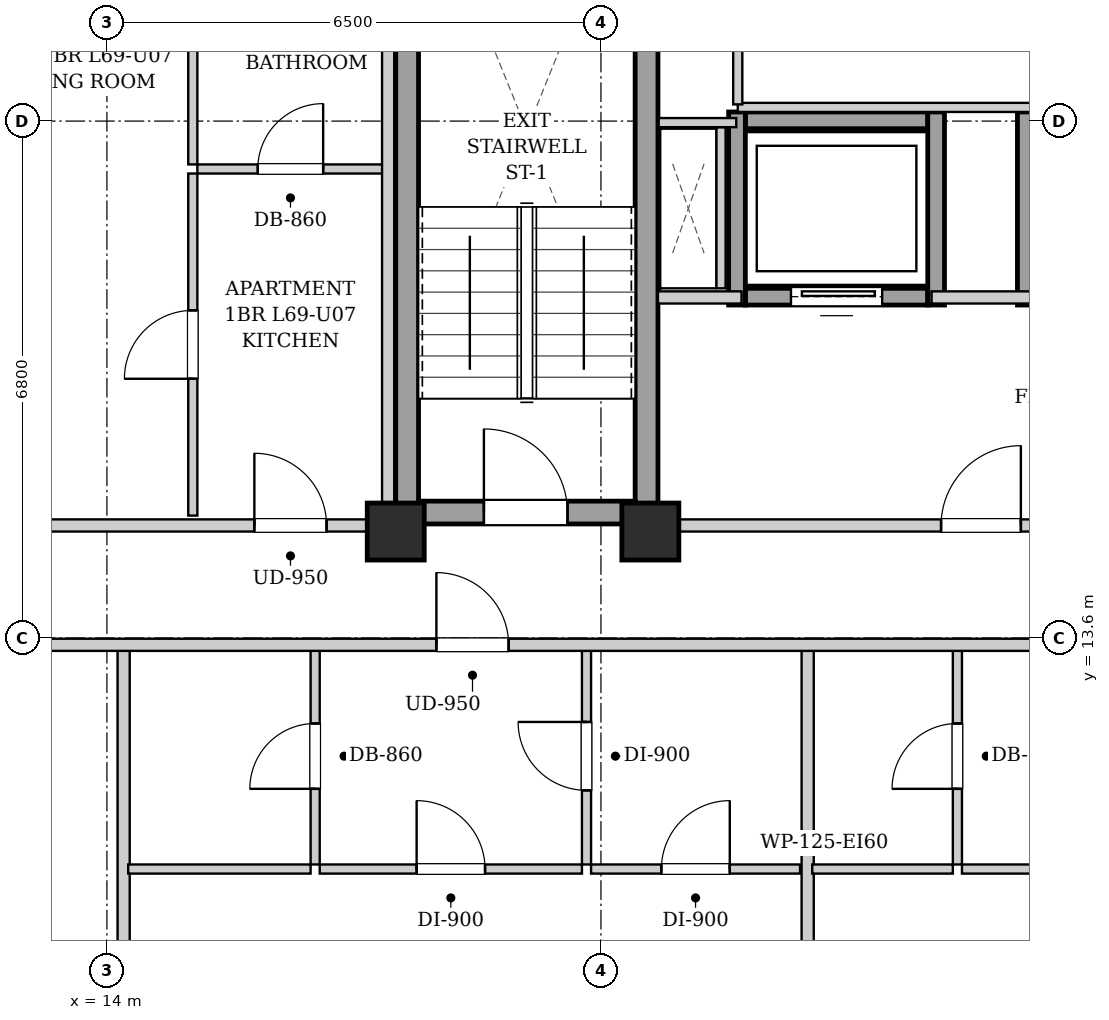
"""IFC4 building model, lengths in metres.
Left out: names, types, materials, properties, quantities, classifications, styles, units other than length and angle.
Written with IfcOpenShell. Run it as: python <this file> out.ifc"""

import sys

from ifc_helpers import new_model, si_unit, direction, frame, frame_2d, origin, origin_2d, place, context, subcontext, project, spatial, rectangle, extrude, element, fill, save


model = new_model("IFC4")
c1 = context("Model", 3, precision=1e-05, world=origin(), true_north=direction((0.0, 1.0)))
c2 = subcontext(c1, "Body", "Model", "MODEL_VIEW")
j1 = project(units=[si_unit("LENGTHUNIT", "METRE"), si_unit("PLANEANGLEUNIT", "RADIAN")], contexts=[c1])
p1 = place(None, origin())
s1 = spatial("IfcSite", under=j1, at=p1, CompositionType="ELEMENT")
p2 = place(p1, origin())
s2 = spatial("IfcBuilding", under=s1, at=p2, CompositionType="ELEMENT")
p3 = place(p2, frame((0.0, 0.0, 237.7)))
s3 = spatial("IfcBuildingStorey", under=s2, at=p3, CompositionType="ELEMENT", Elevation=237.7)
for number, where, z_axis, x_axis in (
    (1, (17.8, 15.0, 0.0), (0.0, 0.0, 1.0), (1.0, 0.0, 0.0)),
    (2, (21.15, 15.0, 0.0), (0.0, 0.0, 1.0), (1.0, 0.0, 0.0)),
):
    element("IfcColumn", number, at=place(p3, frame(where, z_axis=z_axis, x_axis=x_axis)), inside=s3, PredefinedType="COLUMN", context=c2, shape_type="SweptSolid", body=[
        extrude(rectangle(XDim=0.75, YDim=0.75, at=origin_2d()), origin(), (0.0, 0.0, 1.0), 3.4),
    ])
for number, where, z_axis, x_axis in (
    (3, (17.95, 15.1, 0.0), (0.0, 0.0, 1.0), (0.0, 1.0, 0.0)),
    (4, (21.1, 15.1, 0.0), (0.0, 0.0, 1.0), (0.0, 1.0, 0.0)),
):
    element("IfcWall", number, at=place(p3, frame(where, z_axis=z_axis, x_axis=x_axis)), inside=s3, PredefinedType="SHEAR", context=c2, shape_type="SweptSolid", body=[
        extrude(rectangle(XDim=9.0, YDim=0.3, at=frame_2d((4.5, 0.0))), origin(), (0.0, 0.0, 1.0), 3.14),
    ])
p4 = place(p3, frame((18.1, 15.25, 0.0), z_axis=(0.0, 0.0, 1.0), x_axis=(1.0, 0.0, 0.0)))
e5 = element("IfcWall", 5, at=p4, inside=s3, PredefinedType="SHEAR", context=c2, shape_type="SweptSolid", body=[
    extrude(rectangle(XDim=2.85, YDim=0.3, at=frame_2d((1.425, 0.0))), origin(), (0.0, 0.0, 1.0), 3.14),
])
p5 = place(p4, frame((0.86, 0.0, 0.0)))
e6 = element("IfcOpeningElement", 6, at=p5, cuts=e5, PredefinedType="OPENING", context=c2, shape_type="SweptSolid", body=[
    extrude(rectangle(XDim=1.1, YDim=2.05, at=frame_2d((0.55, 1.025))), frame((0.0, 0.16, 0.0), z_axis=(0.0, -1.0, 0.0), x_axis=(1.0, 0.0, 0.0)), (0.0, 0.0, 1.0), 0.32),
])
p6 = place(p3, frame((22.4, 18.09, 0.0), z_axis=(0.0, 0.0, 1.0), x_axis=(1.0, 0.0, 0.0)))
e7 = element("IfcWall", 7, at=p6, inside=s3, PredefinedType="SHEAR", context=c2, shape_type="SweptSolid", body=[
    extrude(rectangle(XDim=2.4, YDim=0.22, at=frame_2d((1.2, 0.0))), origin(), (0.0, 0.0, 1.0), 3.14),
])
p7 = place(p6, frame((0.6, 0.0, 0.0)))
e8 = element("IfcOpeningElement", 8, at=p7, cuts=e7, PredefinedType="OPENING", context=c2, shape_type="SweptSolid", body=[
    extrude(rectangle(XDim=1.2, YDim=2.15, at=frame_2d((0.6, 1.075))), frame((0.0, 0.12, 0.0), z_axis=(0.0, -1.0, 0.0), x_axis=(1.0, 0.0, 0.0)), (0.0, 0.0, 1.0), 0.24),
])
p8 = place(p3, frame((22.4, 20.41, 0.0), z_axis=(0.0, 0.0, 1.0), x_axis=(1.0, 0.0, 0.0)))
e9 = element("IfcWall", 9, at=p8, inside=s3, PredefinedType="SHEAR", context=c2, shape_type="SweptSolid", body=[
    extrude(rectangle(XDim=2.4, YDim=0.22, at=frame_2d((1.2, 0.0))), origin(), (0.0, 0.0, 1.0), 3.14),
])
for number, where, z_axis, x_axis in (
    (10, (22.29, 17.98, 0.0), (0.0, 0.0, 1.0), (0.0, 1.0, 0.0)),
    (11, (24.91, 17.98, 0.0), (0.0, 0.0, 1.0), (0.0, 1.0, 0.0)),
    (12, (26.09, 17.98, 0.0), (0.0, 0.0, 1.0), (0.0, 1.0, 0.0)),
):
    element("IfcWall", number, at=place(p3, frame(where, z_axis=z_axis, x_axis=x_axis)), inside=s3, PredefinedType="SHEAR", context=c2, shape_type="SweptSolid", body=[
        extrude(rectangle(XDim=2.54, YDim=0.22, at=frame_2d((1.27, 0.0))), origin(), (0.0, 0.0, 1.0), 3.14),
    ])
p9 = place(p3, frame((21.25, 15.08, 0.0), z_axis=(0.0, 0.0, 1.0), x_axis=(1.0, 0.0, 0.0)))
e13 = element("IfcWall", 13, at=p9, inside=s3, PredefinedType="PARTITIONING", context=c2, shape_type="SweptSolid", body=[
    extrude(rectangle(XDim=8.5, YDim=0.16, at=frame_2d((4.25, 0.0))), origin(), (0.0, 0.0, 1.0), 2.668),
])
p10 = place(p9, frame((3.725, 0.0, 0.0)))
e14 = element("IfcOpeningElement", 14, at=p10, cuts=e13, PredefinedType="OPENING", context=c2, shape_type="SweptSolid", body=[
    extrude(rectangle(XDim=1.05, YDim=2.05, at=frame_2d((0.525, 1.025))), frame((0.0, 0.09, 0.0), z_axis=(0.0, -1.0, 0.0), x_axis=(1.0, 0.0, 0.0)), (0.0, 0.0, 1.0), 0.18),
])
p11 = place(p3, frame((21.25, 18.08, 0.0), z_axis=(0.0, 0.0, 1.0), x_axis=(1.0, 0.0, 0.0)))
e15 = element("IfcWall", 15, at=p11, inside=s3, PredefinedType="PARTITIONING", context=c2, shape_type="SweptSolid", body=[
    extrude(rectangle(XDim=1.1, YDim=0.16, at=frame_2d((0.55, 0.0))), origin(), (0.0, 0.0, 1.0), 3.14),
])
p12 = place(p3, frame((24.85, 18.08, 0.0), z_axis=(0.0, 0.0, 1.0), x_axis=(1.0, 0.0, 0.0)))
e16 = element("IfcWall", 16, at=p12, inside=s3, PredefinedType="PARTITIONING", context=c2, shape_type="SweptSolid", body=[
    extrude(rectangle(XDim=1.3, YDim=0.16, at=frame_2d((0.65, 0.0))), origin(), (0.0, 0.0, 1.0), 3.14),
])
p13 = place(p3, frame((22.08, 18.2, 0.0), z_axis=(0.0, 0.0, 1.0), x_axis=(0.0, 1.0, 0.0)))
e17 = element("IfcWall", 17, at=p13, inside=s3, PredefinedType="PARTITIONING", context=c2, shape_type="SweptSolid", body=[
    extrude(rectangle(XDim=2.12, YDim=0.12, at=frame_2d((1.06, 0.0))), origin(), (0.0, 0.0, 1.0), 3.14),
])
p14 = place(p3, frame((22.28, 20.38, 0.0), z_axis=(0.0, 0.0, 1.0), x_axis=(-1.0, 0.0, 0.0)))
e18 = element("IfcWall", 18, at=p14, inside=s3, PredefinedType="PARTITIONING", context=c2, shape_type="SweptSolid", body=[
    extrude(rectangle(XDim=1.02, YDim=0.12, at=frame_2d((0.51, 0.0))), origin(), (0.0, 0.0, 1.0), 3.14),
])
p15 = place(p3, frame((22.3, 20.58, 0.0), z_axis=(0.0, 0.0, 1.0), x_axis=(1.0, 0.0, 0.0)))
e19 = element("IfcWall", 19, at=p15, inside=s3, PredefinedType="PARTITIONING", context=c2, shape_type="SweptSolid", body=[
    extrude(rectangle(XDim=7.35, YDim=0.12, at=frame_2d((3.675, 0.0))), origin(), (0.0, 0.0, 1.0), 3.14),
])
p16 = place(p3, frame((22.3, 20.62, 0.0), z_axis=(0.0, 0.0, 1.0), x_axis=(0.0, 1.0, 0.0)))
e20 = element("IfcWall", 20, at=p16, inside=s3, PredefinedType="PARTITIONING", context=c2, shape_type="SweptSolid", body=[
    extrude(rectangle(XDim=2.06, YDim=0.12, at=frame_2d((1.03, 0.0))), origin(), (0.0, 0.0, 1.0), 3.14),
])
p17 = place(p3, frame((14.22, 4.08, 0.0), z_axis=(0.0, 0.0, 1.0), x_axis=(0.0, 1.0, 0.0)))
e21 = element("IfcWall", 21, at=p17, inside=s3, PredefinedType="PARTITIONING", context=c2, shape_type="SweptSolid", body=[
    extrude(rectangle(XDim=9.39, YDim=0.16, at=frame_2d((4.695, 0.0))), origin(), (0.0, 0.0, 1.0), 3.14),
])
p18 = place(p3, frame((16.74, 10.62, 0.0), z_axis=(0.0, 0.0, 1.0), x_axis=(0.0, 1.0, 0.0)))
e22 = element("IfcWall", 22, at=p18, inside=s3, PredefinedType="PARTITIONING", context=c2, shape_type="SweptSolid", body=[
    extrude(rectangle(XDim=2.85, YDim=0.12, at=frame_2d((1.425, 0.0))), origin(), (0.0, 0.0, 1.0), 3.14),
])
p19 = place(p18, frame((0.995, 0.0, 0.0)))
e23 = element("IfcOpeningElement", 23, at=p19, cuts=e22, PredefinedType="OPENING", context=c2, shape_type="SweptSolid", body=[
    extrude(rectangle(XDim=0.86, YDim=2.05, at=frame_2d((0.43, 1.025))), frame((0.0, 0.07, 0.0), z_axis=(0.0, -1.0, 0.0), x_axis=(1.0, 0.0, 0.0)), (0.0, 0.0, 1.0), 0.14),
])
p20 = place(p3, frame((14.28, 10.56, 0.0), z_axis=(0.0, 0.0, 1.0), x_axis=(1.0, 0.0, 0.0)))
e24 = element("IfcWall", 24, at=p20, inside=s3, PredefinedType="PARTITIONING", context=c2, shape_type="SweptSolid", body=[
    extrude(rectangle(XDim=2.4, YDim=0.12, at=frame_2d((1.2, 0.0))), origin(), (0.0, 0.0, 1.0), 3.14),
])
p21 = place(p3, frame((20.31, 10.62, 0.0), z_axis=(0.0, 0.0, 1.0), x_axis=(0.0, 1.0, 0.0)))
e25 = element("IfcWall", 25, at=p21, inside=s3, PredefinedType="PARTITIONING", context=c2, shape_type="SweptSolid", body=[
    extrude(rectangle(XDim=2.85, YDim=0.12, at=frame_2d((1.425, 0.0))), origin(), (0.0, 0.0, 1.0), 3.14),
])
p22 = place(p21, frame((0.975, 0.0, 0.0)))
e26 = element("IfcOpeningElement", 26, at=p22, cuts=e25, PredefinedType="OPENING", context=c2, shape_type="SweptSolid", body=[
    extrude(rectangle(XDim=0.9, YDim=2.05, at=frame_2d((0.45, 1.025))), frame((0.0, 0.07, 0.0), z_axis=(0.0, -1.0, 0.0), x_axis=(1.0, 0.0, 0.0)), (0.0, 0.0, 1.0), 0.14),
])
p23 = place(p3, frame((16.8, 10.56, 0.0), z_axis=(0.0, 0.0, 1.0), x_axis=(1.0, 0.0, 0.0)))
e27 = element("IfcWall", 27, at=p23, inside=s3, PredefinedType="PARTITIONING", context=c2, shape_type="SweptSolid", body=[
    extrude(rectangle(XDim=3.45, YDim=0.12, at=frame_2d((1.725, 0.0))), origin(), (0.0, 0.0, 1.0), 3.14),
])
p24 = place(p23, frame((1.275, 0.0, 0.0)))
e28 = element("IfcOpeningElement", 28, at=p24, cuts=e27, PredefinedType="OPENING", context=c2, shape_type="SweptSolid", body=[
    extrude(rectangle(XDim=0.9, YDim=2.05, at=frame_2d((0.45, 1.025))), frame((0.0, 0.07, 0.0), z_axis=(0.0, -1.0, 0.0), x_axis=(1.0, 0.0, 0.0)), (0.0, 0.0, 1.0), 0.14),
])
p25 = place(p3, frame((20.37, 10.56, 0.0), z_axis=(0.0, 0.0, 1.0), x_axis=(1.0, 0.0, 0.0)))
e29 = element("IfcWall", 29, at=p25, inside=s3, PredefinedType="PARTITIONING", context=c2, shape_type="SweptSolid", body=[
    extrude(rectangle(XDim=2.75, YDim=0.12, at=frame_2d((1.375, 0.0))), origin(), (0.0, 0.0, 1.0), 3.14),
])
p26 = place(p25, frame((0.925, 0.0, 0.0)))
e30 = element("IfcOpeningElement", 30, at=p26, cuts=e29, PredefinedType="OPENING", context=c2, shape_type="SweptSolid", body=[
    extrude(rectangle(XDim=0.9, YDim=2.05, at=frame_2d((0.45, 1.025))), frame((0.0, 0.07, 0.0), z_axis=(0.0, -1.0, 0.0), x_axis=(1.0, 0.0, 0.0)), (0.0, 0.0, 1.0), 0.14),
])
p27 = place(p3, frame((23.22, 4.08, 0.0), z_axis=(0.0, 0.0, 1.0), x_axis=(0.0, 1.0, 0.0)))
e31 = element("IfcWall", 31, at=p27, inside=s3, PredefinedType="PARTITIONING", context=c2, shape_type="SweptSolid", body=[
    extrude(rectangle(XDim=9.39, YDim=0.16, at=frame_2d((4.695, 0.0))), origin(), (0.0, 0.0, 1.0), 3.14),
])
p28 = place(p3, frame((25.19, 10.62, 0.0), z_axis=(0.0, 0.0, 1.0), x_axis=(0.0, 1.0, 0.0)))
e32 = element("IfcWall", 32, at=p28, inside=s3, PredefinedType="PARTITIONING", context=c2, shape_type="SweptSolid", body=[
    extrude(rectangle(XDim=2.85, YDim=0.12, at=frame_2d((1.425, 0.0))), origin(), (0.0, 0.0, 1.0), 3.14),
])
p29 = place(p28, frame((0.995, 0.0, 0.0)))
e33 = element("IfcOpeningElement", 33, at=p29, cuts=e32, PredefinedType="OPENING", context=c2, shape_type="SweptSolid", body=[
    extrude(rectangle(XDim=0.86, YDim=2.05, at=frame_2d((0.43, 1.025))), frame((0.0, 0.07, 0.0), z_axis=(0.0, -1.0, 0.0), x_axis=(1.0, 0.0, 0.0)), (0.0, 0.0, 1.0), 0.14),
])
p30 = place(p3, frame((23.28, 10.56, 0.0), z_axis=(0.0, 0.0, 1.0), x_axis=(1.0, 0.0, 0.0)))
e34 = element("IfcWall", 34, at=p30, inside=s3, PredefinedType="PARTITIONING", context=c2, shape_type="SweptSolid", body=[
    extrude(rectangle(XDim=1.85, YDim=0.12, at=frame_2d((0.925, 0.0))), origin(), (0.0, 0.0, 1.0), 3.14),
])
p31 = place(p3, frame((25.25, 10.56, 0.0), z_axis=(0.0, 0.0, 1.0), x_axis=(1.0, 0.0, 0.0)))
e35 = element("IfcWall", 35, at=p31, inside=s3, PredefinedType="PARTITIONING", context=c2, shape_type="SweptSolid", body=[
    extrude(rectangle(XDim=3.755, YDim=0.12, at=frame_2d((1.877, 0.0))), origin(), (0.0, 0.0, 1.0), 3.14),
])
p32 = place(p31, frame((1.427, 0.0, 0.0)))
e36 = element("IfcOpeningElement", 36, at=p32, cuts=e35, PredefinedType="OPENING", context=c2, shape_type="SweptSolid", body=[
    extrude(rectangle(XDim=0.9, YDim=2.05, at=frame_2d((0.45, 1.025))), frame((0.0, 0.07, 0.0), z_axis=(0.0, -1.0, 0.0), x_axis=(1.0, 0.0, 0.0)), (0.0, 0.0, 1.0), 0.14),
])
p33 = place(p3, frame((10.88, 15.08, 0.0), z_axis=(0.0, 0.0, 1.0), x_axis=(1.0, 0.0, 0.0)))
e37 = element("IfcWall", 37, at=p33, inside=s3, PredefinedType="PARTITIONING", context=c2, shape_type="SweptSolid", body=[
    extrude(rectangle(XDim=6.88, YDim=0.16, at=frame_2d((3.44, 0.0))), origin(), (0.0, 0.0, 1.0), 2.668),
])
p34 = place(p33, frame((5.06, 0.0, 0.0)))
e38 = element("IfcOpeningElement", 38, at=p34, cuts=e37, PredefinedType="OPENING", context=c2, shape_type="SweptSolid", body=[
    extrude(rectangle(XDim=0.95, YDim=2.1, at=frame_2d((0.475, 1.05))), frame((0.0, 0.09, 0.0), z_axis=(0.0, -1.0, 0.0), x_axis=(1.0, 0.0, 0.0)), (0.0, 0.0, 1.0), 0.18),
])
p35 = place(p3, frame((15.19, 19.77, 0.0), z_axis=(0.0, 0.0, 1.0), x_axis=(1.0, 0.0, 0.0)))
e39 = element("IfcWall", 39, at=p35, inside=s3, PredefinedType="PARTITIONING", context=c2, shape_type="SweptSolid", body=[
    extrude(rectangle(XDim=2.45, YDim=0.12, at=frame_2d((1.225, 0.0))), origin(), (0.0, 0.0, 1.0), 3.14),
])
p36 = place(p35, frame((0.795, 0.0, 0.0)))
e40 = element("IfcOpeningElement", 40, at=p36, cuts=e39, PredefinedType="OPENING", context=c2, shape_type="SweptSolid", body=[
    extrude(rectangle(XDim=0.86, YDim=2.05, at=frame_2d((0.43, 1.025))), frame((0.0, 0.07, 0.0), z_axis=(0.0, -1.0, 0.0), x_axis=(1.0, 0.0, 0.0)), (0.0, 0.0, 1.0), 0.14),
])
p37 = place(p3, frame((15.13, 19.83, 0.0), z_axis=(0.0, 0.0, 1.0), x_axis=(0.0, 1.0, 0.0)))
e41 = element("IfcWall", 41, at=p37, inside=s3, PredefinedType="PARTITIONING", context=c2, shape_type="SweptSolid", body=[
    extrude(rectangle(XDim=2.159, YDim=0.12, at=frame_2d((1.08, 0.0))), origin(), (0.0, 0.0, 1.0), 3.14),
])
p38 = place(p3, frame((15.13, 15.21, 0.0), z_axis=(0.0, 0.0, 1.0), x_axis=(0.0, 1.0, 0.0)))
e42 = element("IfcWall", 42, at=p38, inside=s3, PredefinedType="PARTITIONING", context=c2, shape_type="SweptSolid", body=[
    extrude(rectangle(XDim=4.5, YDim=0.12, at=frame_2d((2.25, 0.0))), origin(), (0.0, 0.0, 1.0), 3.14),
])
p39 = place(p38, frame((1.8, 0.0, 0.0)))
e43 = element("IfcOpeningElement", 43, at=p39, cuts=e42, PredefinedType="OPENING", context=c2, shape_type="SweptSolid", body=[
    extrude(rectangle(XDim=0.9, YDim=2.05, at=frame_2d((0.45, 1.025))), frame((0.0, 0.07, 0.0), z_axis=(0.0, -1.0, 0.0), x_axis=(1.0, 0.0, 0.0)), (0.0, 0.0, 1.0), 0.14),
])
p40 = place(p3, frame((13.15, 13.51, 0.0), z_axis=(0.0, 0.0, 1.0), x_axis=(1.0, 0.0, 0.0)))
e44 = element("IfcWall", 44, at=p40, inside=s3, PredefinedType="PARTITIONING", context=c2, shape_type="SweptSolid", body=[
    extrude(rectangle(XDim=24.6, YDim=0.16, at=frame_2d((12.3, 0.0))), origin(), (0.0, 0.0, 1.0), 3.14),
])
p41 = place(p40, frame((5.185, 0.0, 0.0)))
e45 = element("IfcOpeningElement", 45, at=p41, cuts=e44, PredefinedType="OPENING", context=c2, shape_type="SweptSolid", body=[
    extrude(rectangle(XDim=0.95, YDim=2.1, at=frame_2d((0.475, 1.05))), frame((0.0, 0.09, 0.0), z_axis=(0.0, -1.0, 0.0), x_axis=(1.0, 0.0, 0.0)), (0.0, 0.0, 1.0), 0.18),
])
p42 = place(p40, frame((13.503, 0.0, 0.0)))
e46 = element("IfcOpeningElement", 46, at=p42, cuts=e44, PredefinedType="OPENING", context=c2, shape_type="SweptSolid", body=[
    extrude(rectangle(XDim=0.95, YDim=2.1, at=frame_2d((0.475, 1.05))), frame((0.0, 0.09, 0.0), z_axis=(0.0, -1.0, 0.0), x_axis=(1.0, 0.0, 0.0)), (0.0, 0.0, 1.0), 0.18),
])
p43 = place(p40, frame((20.585, 0.0, 0.0)))
e47 = element("IfcOpeningElement", 47, at=p43, cuts=e44, PredefinedType="OPENING", context=c2, shape_type="SweptSolid", body=[
    extrude(rectangle(XDim=0.95, YDim=2.1, at=frame_2d((0.475, 1.05))), frame((0.0, 0.09, 0.0), z_axis=(0.0, -1.0, 0.0), x_axis=(1.0, 0.0, 0.0)), (0.0, 0.0, 1.0), 0.18),
])
p44 = place(p3, frame((17.7, 15.02, 0.0), z_axis=(0.0, 0.0, 1.0), x_axis=(0.0, 1.0, 0.0)))
e48 = element("IfcWall", 48, at=p44, inside=s3, PredefinedType="PARTITIONING", context=c2, shape_type="SweptSolid", body=[
    extrude(rectangle(XDim=13.98, YDim=0.16, at=frame_2d((6.99, 0.0))), origin(), (0.0, 0.0, 1.0), 2.475),
])
p45 = place(p5, origin())
e49 = element("IfcDoor", 49, at=p45, inside=s3, OperationType="SINGLE_SWING_LEFT", PredefinedType="DOOR", context=c2, shape_type="SweptSolid", body=[
    extrude(rectangle(XDim=1.1, YDim=2.05, at=frame_2d((0.55, 1.025))), frame((0.0, 0.025, 0.0), z_axis=(0.0, -1.0, 0.0), x_axis=(1.0, 0.0, 0.0)), (0.0, 0.0, 1.0), 0.05),
])
fill(e6, e49)
p46 = place(p7, origin())
e50 = element("IfcDoor", 50, at=p46, inside=s3, OperationType="SLIDING_TO_LEFT", PredefinedType="DOOR", context=c2, shape_type="SweptSolid", body=[
    extrude(rectangle(XDim=1.2, YDim=2.15, at=frame_2d((0.6, 1.075))), frame((0.0, 0.025, 0.0), z_axis=(0.0, -1.0, 0.0), x_axis=(1.0, 0.0, 0.0)), (0.0, 0.0, 1.0), 0.05),
])
fill(e8, e50)
p47 = place(p10, origin())
e51 = element("IfcDoor", 51, at=p47, inside=s3, OperationType="SINGLE_SWING_RIGHT", PredefinedType="DOOR", context=c2, shape_type="SweptSolid", body=[
    extrude(rectangle(XDim=1.05, YDim=2.05, at=frame_2d((0.525, 1.025))), frame((0.0, 0.025, 0.0), z_axis=(0.0, -1.0, 0.0), x_axis=(1.0, 0.0, 0.0)), (0.0, 0.0, 1.0), 0.05),
])
fill(e14, e51)
p48 = place(p19, origin())
e52 = element("IfcDoor", 52, at=p48, inside=s3, OperationType="SINGLE_SWING_LEFT", PredefinedType="DOOR", context=c2, shape_type="SweptSolid", body=[
    extrude(rectangle(XDim=0.86, YDim=2.05, at=frame_2d((0.43, 1.025))), frame((0.0, 0.025, 0.0), z_axis=(0.0, -1.0, 0.0), x_axis=(1.0, 0.0, 0.0)), (0.0, 0.0, 1.0), 0.05),
])
fill(e23, e52)
p49 = place(p22, origin())
e53 = element("IfcDoor", 53, at=p49, inside=s3, OperationType="SINGLE_SWING_RIGHT", PredefinedType="DOOR", context=c2, shape_type="SweptSolid", body=[
    extrude(rectangle(XDim=0.9, YDim=2.05, at=frame_2d((0.45, 1.025))), frame((0.0, 0.025, 0.0), z_axis=(0.0, -1.0, 0.0), x_axis=(1.0, 0.0, 0.0)), (0.0, 0.0, 1.0), 0.05),
])
fill(e26, e53)
p50 = place(p24, origin())
e54 = element("IfcDoor", 54, at=p50, inside=s3, OperationType="SINGLE_SWING_LEFT", PredefinedType="DOOR", context=c2, shape_type="SweptSolid", body=[
    extrude(rectangle(XDim=0.9, YDim=2.05, at=frame_2d((0.45, 1.025))), frame((0.0, 0.025, 0.0), z_axis=(0.0, -1.0, 0.0), x_axis=(1.0, 0.0, 0.0)), (0.0, 0.0, 1.0), 0.05),
])
fill(e28, e54)
p51 = place(p26, origin())
e55 = element("IfcDoor", 55, at=p51, inside=s3, OperationType="SINGLE_SWING_RIGHT", PredefinedType="DOOR", context=c2, shape_type="SweptSolid", body=[
    extrude(rectangle(XDim=0.9, YDim=2.05, at=frame_2d((0.45, 1.025))), frame((0.0, 0.025, 0.0), z_axis=(0.0, -1.0, 0.0), x_axis=(1.0, 0.0, 0.0)), (0.0, 0.0, 1.0), 0.05),
])
fill(e30, e55)
p52 = place(p29, origin())
e56 = element("IfcDoor", 56, at=p52, inside=s3, OperationType="SINGLE_SWING_LEFT", PredefinedType="DOOR", context=c2, shape_type="SweptSolid", body=[
    extrude(rectangle(XDim=0.86, YDim=2.05, at=frame_2d((0.43, 1.025))), frame((0.0, 0.025, 0.0), z_axis=(0.0, -1.0, 0.0), x_axis=(1.0, 0.0, 0.0)), (0.0, 0.0, 1.0), 0.05),
])
fill(e33, e56)
p53 = place(p34, origin())
e57 = element("IfcDoor", 57, at=p53, inside=s3, OperationType="SINGLE_SWING_LEFT", PredefinedType="DOOR", context=c2, shape_type="SweptSolid", body=[
    extrude(rectangle(XDim=0.95, YDim=2.1, at=frame_2d((0.475, 1.05))), frame((0.0, 0.025, 0.0), z_axis=(0.0, -1.0, 0.0), x_axis=(1.0, 0.0, 0.0)), (0.0, 0.0, 1.0), 0.05),
])
fill(e38, e57)
p54 = place(p36, origin())
e58 = element("IfcDoor", 58, at=p54, inside=s3, OperationType="SINGLE_SWING_RIGHT", PredefinedType="DOOR", context=c2, shape_type="SweptSolid", body=[
    extrude(rectangle(XDim=0.86, YDim=2.05, at=frame_2d((0.43, 1.025))), frame((0.0, 0.025, 0.0), z_axis=(0.0, -1.0, 0.0), x_axis=(1.0, 0.0, 0.0)), (0.0, 0.0, 1.0), 0.05),
])
fill(e40, e58)
p55 = place(p39, origin())
e59 = element("IfcDoor", 59, at=p55, inside=s3, OperationType="SINGLE_SWING_LEFT", PredefinedType="DOOR", context=c2, shape_type="SweptSolid", body=[
    extrude(rectangle(XDim=0.9, YDim=2.05, at=frame_2d((0.45, 1.025))), frame((0.0, 0.025, 0.0), z_axis=(0.0, -1.0, 0.0), x_axis=(1.0, 0.0, 0.0)), (0.0, 0.0, 1.0), 0.05),
])
fill(e43, e59)
p56 = place(p41, origin())
e60 = element("IfcDoor", 60, at=p56, inside=s3, OperationType="SINGLE_SWING_LEFT", PredefinedType="DOOR", context=c2, shape_type="SweptSolid", body=[
    extrude(rectangle(XDim=0.95, YDim=2.1, at=frame_2d((0.475, 1.05))), frame((0.0, 0.025, 0.0), z_axis=(0.0, -1.0, 0.0), x_axis=(1.0, 0.0, 0.0)), (0.0, 0.0, 1.0), 0.05),
])
fill(e45, e60)
save(model, sys.argv[1])
